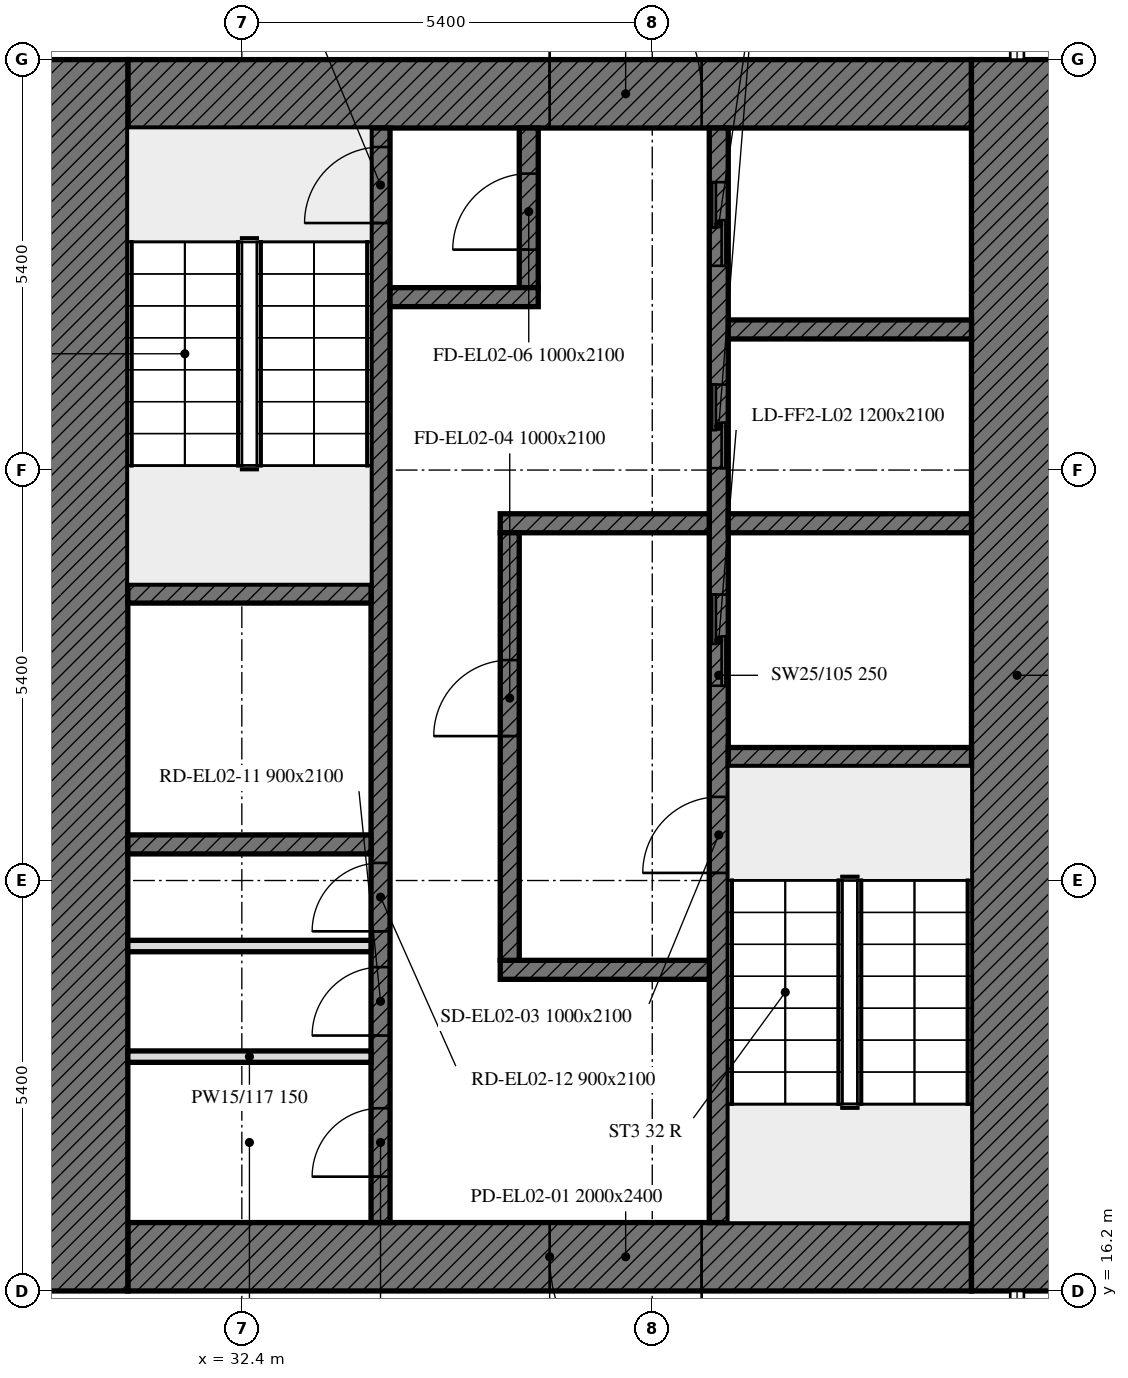
"""IFC4 building model, lengths in metres.
Left out: names, types, materials, properties, quantities, classifications, styles, units other than length and angle.
Written with IfcOpenShell. Run it as: python <this file> out.ifc"""

import sys

from ifc_helpers import new_model, si_unit, direction, frame, frame_2d, origin, place, context, subcontext, project, spatial, rectangle, extrude, element, fill, save


model = new_model("IFC4")
c1 = context("Model", 3, precision=1e-05, world=origin(), true_north=direction((0.0, 1.0)))
c2 = subcontext(c1, "Body", "Model", "MODEL_VIEW")
j1 = project(units=[si_unit("LENGTHUNIT", "METRE"), si_unit("PLANEANGLEUNIT", "RADIAN")], contexts=[c1])
p1 = place(None, origin())
s1 = spatial("IfcSite", under=j1, at=p1, CompositionType="ELEMENT")
p2 = place(p1, origin())
s2 = spatial("IfcBuilding", under=s1, at=p2, CompositionType="ELEMENT")
p3 = place(p2, frame((0.0, 0.0, 14.4)))
s3 = spatial("IfcBuildingStorey", under=s2, at=p3, CompositionType="ELEMENT", Elevation=14.4)
p4 = place(p3, frame((42.0, 16.65, 0.0), z_axis=(0.0, 0.0, 1.0), x_axis=(-1.0, 0.0, 0.0)))
e1 = element("IfcWall", 1, at=p4, inside=s3, PredefinedType="SOLIDWALL", context=c2, shape_type="SweptSolid", body=[
    extrude(rectangle(XDim=11.1, YDim=0.9, at=frame_2d((5.55, 0.0))), origin(), (0.0, 0.0, 1.0), 5.0),
])
p5 = place(p4, frame((3.55, 0.0, 0.0)))
e2 = element("IfcOpeningElement", 2, at=p5, cuts=e1, PredefinedType="OPENING", context=c2, shape_type="SweptSolid", body=[
    extrude(rectangle(XDim=2.0, YDim=2.4, at=frame_2d((1.0, 1.2))), frame((0.0, 0.45, 0.0), z_axis=(0.0, -1.0, 0.0), x_axis=(1.0, 0.0, 0.0)), (0.0, 0.0, 1.0), 0.9),
])
p6 = place(p3, frame((30.9, 31.95, 0.0), z_axis=(0.0, 0.0, 1.0), x_axis=(1.0, 0.0, 0.0)))
e3 = element("IfcWall", 3, at=p6, inside=s3, PredefinedType="SOLIDWALL", context=c2, shape_type="SweptSolid", body=[
    extrude(rectangle(XDim=11.1, YDim=0.9, at=frame_2d((5.55, 0.0))), origin(), (0.0, 0.0, 1.0), 5.0),
])
p7 = place(p6, frame((5.55, 0.0, 0.0)))
e4 = element("IfcOpeningElement", 4, at=p7, cuts=e3, PredefinedType="OPENING", context=c2, shape_type="SweptSolid", body=[
    extrude(rectangle(XDim=2.0, YDim=2.4, at=frame_2d((1.0, 1.2))), frame((0.0, 0.45, 0.0), z_axis=(0.0, -1.0, 0.0), x_axis=(1.0, 0.0, 0.0)), (0.0, 0.0, 1.0), 0.9),
])
for number, where, z_axis, x_axis in (
    (5, (42.6, 32.4, 0.0), (0.0, 0.0, 1.0), (0.0, -1.0, 0.0)),
    (6, (30.3, 16.2, 0.0), (0.0, 0.0, 1.0), (0.0, 1.0, 0.0)),
):
    element("IfcWall", number, at=place(p3, frame(where, z_axis=z_axis, x_axis=x_axis)), inside=s3, PredefinedType="SOLIDWALL", context=c2, shape_type="SweptSolid", body=[
        extrude(rectangle(XDim=16.2, YDim=1.2, at=frame_2d((8.1, 0.0))), origin(), (0.0, 0.0, 1.0), 5.0),
    ])
p8 = place(p3, frame((38.675, 17.1, 0.0), z_axis=(0.0, 0.0, 1.0), x_axis=(0.0, 1.0, 0.0)))
e7 = element("IfcWall", 7, at=p8, inside=s3, PredefinedType="SOLIDWALL", context=c2, shape_type="SweptSolid", body=[
    extrude(rectangle(XDim=14.4, YDim=0.25, at=frame_2d((7.2, 0.0))), origin(), (0.0, 0.0, 1.0), 5.0),
])
p9 = place(p8, frame((4.6, 0.0, 0.0)))
e8 = element("IfcOpeningElement", 8, at=p9, cuts=e7, PredefinedType="OPENING", context=c2, shape_type="SweptSolid", body=[
    extrude(rectangle(XDim=1.0, YDim=2.1, at=frame_2d((0.5, 1.05))), frame((0.0, 0.125, 0.0), z_axis=(0.0, -1.0, 0.0), x_axis=(1.0, 0.0, 0.0)), (0.0, 0.0, 1.0), 0.25),
])
p10 = place(p8, frame((7.062, 0.0, 0.0)))
e9 = element("IfcOpeningElement", 9, at=p10, cuts=e7, PredefinedType="OPENING", context=c2, shape_type="SweptSolid", body=[
    extrude(rectangle(XDim=1.2, YDim=2.1, at=frame_2d((0.6, 1.05))), frame((0.0, 0.125, 0.0), z_axis=(0.0, -1.0, 0.0), x_axis=(1.0, 0.0, 0.0)), (0.0, 0.0, 1.0), 0.25),
])
p11 = place(p8, frame((9.925, 0.0, 0.0)))
e10 = element("IfcOpeningElement", 10, at=p11, cuts=e7, PredefinedType="OPENING", context=c2, shape_type="SweptSolid", body=[
    extrude(rectangle(XDim=1.1, YDim=2.1, at=frame_2d((0.55, 1.05))), frame((0.0, 0.125, 0.0), z_axis=(0.0, -1.0, 0.0), x_axis=(1.0, 0.0, 0.0)), (0.0, 0.0, 1.0), 0.25),
])
p12 = place(p8, frame((12.587, 0.0, 0.0)))
e11 = element("IfcOpeningElement", 11, at=p12, cuts=e7, PredefinedType="OPENING", context=c2, shape_type="SweptSolid", body=[
    extrude(rectangle(XDim=1.1, YDim=2.1, at=frame_2d((0.55, 1.05))), frame((0.0, 0.125, 0.0), z_axis=(0.0, -1.0, 0.0), x_axis=(1.0, 0.0, 0.0)), (0.0, 0.0, 1.0), 0.25),
])
p13 = place(p3, frame((34.225, 17.1, 0.0), z_axis=(0.0, 0.0, 1.0), x_axis=(0.0, 1.0, 0.0)))
e12 = element("IfcWall", 12, at=p13, inside=s3, PredefinedType="SOLIDWALL", context=c2, shape_type="SweptSolid", body=[
    extrude(rectangle(XDim=14.4, YDim=0.25, at=frame_2d((7.2, 0.0))), origin(), (0.0, 0.0, 1.0), 5.0),
])
p14 = place(p13, frame((13.15, 0.0, 0.0)))
e13 = element("IfcOpeningElement", 13, at=p14, cuts=e12, PredefinedType="OPENING", context=c2, shape_type="SweptSolid", body=[
    extrude(rectangle(XDim=1.0, YDim=2.1, at=frame_2d((0.5, 1.05))), frame((0.0, 0.125, 0.0), z_axis=(0.0, -1.0, 0.0), x_axis=(1.0, 0.0, 0.0)), (0.0, 0.0, 1.0), 0.25),
])
p15 = place(p13, frame((0.604, 0.0, 0.0)))
e14 = element("IfcOpeningElement", 14, at=p15, cuts=e12, PredefinedType="OPENING", context=c2, shape_type="SweptSolid", body=[
    extrude(rectangle(XDim=0.9, YDim=2.1, at=frame_2d((0.45, 1.05))), frame((0.0, 0.125, 0.0), z_axis=(0.0, -1.0, 0.0), x_axis=(1.0, 0.0, 0.0)), (0.0, 0.0, 1.0), 0.25),
])
p16 = place(p13, frame((2.46, 0.0, 0.0)))
e15 = element("IfcOpeningElement", 15, at=p16, cuts=e12, PredefinedType="OPENING", context=c2, shape_type="SweptSolid", body=[
    extrude(rectangle(XDim=0.9, YDim=2.1, at=frame_2d((0.45, 1.05))), frame((0.0, 0.125, 0.0), z_axis=(0.0, -1.0, 0.0), x_axis=(1.0, 0.0, 0.0)), (0.0, 0.0, 1.0), 0.25),
])
p17 = place(p13, frame((3.832, 0.0, 0.0)))
e16 = element("IfcOpeningElement", 16, at=p17, cuts=e12, PredefinedType="OPENING", context=c2, shape_type="SweptSolid", body=[
    extrude(rectangle(XDim=0.9, YDim=2.1, at=frame_2d((0.45, 1.05))), frame((0.0, 0.125, 0.0), z_axis=(0.0, -1.0, 0.0), x_axis=(1.0, 0.0, 0.0)), (0.0, 0.0, 1.0), 0.25),
])
p18 = place(p3, frame((38.8, 23.225, 0.0), z_axis=(0.0, 0.0, 1.0), x_axis=(1.0, 0.0, 0.0)))
e17 = element("IfcWall", 17, at=p18, inside=s3, PredefinedType="SOLIDWALL", context=c2, shape_type="SweptSolid", body=[
    extrude(rectangle(XDim=3.2, YDim=0.25, at=frame_2d((1.6, 0.0))), origin(), (0.0, 0.0, 1.0), 5.0),
])
for number, where, z_axis, x_axis in (
    (18, (30.9, 25.375, 0.0), (0.0, 0.0, 1.0), (1.0, 0.0, 0.0)),
    (19, (30.9, 22.075, 0.0), (0.0, 0.0, 1.0), (1.0, 0.0, 0.0)),
):
    element("IfcWall", number, at=place(p3, frame(where, z_axis=z_axis, x_axis=x_axis)), inside=s3, PredefinedType="SOLIDWALL", context=c2, shape_type="SweptSolid", body=[
        extrude(rectangle(XDim=3.2, YDim=0.25, at=frame_2d((1.6, 0.0))), origin(), (0.0, 0.0, 1.0), 5.0),
    ])
p19 = place(p3, frame((38.8, 26.3, 0.0), z_axis=(0.0, 0.0, 1.0), x_axis=(1.0, 0.0, 0.0)))
e20 = element("IfcWall", 20, at=p19, inside=s3, PredefinedType="SOLIDWALL", context=c2, shape_type="SweptSolid", body=[
    extrude(rectangle(XDim=3.2, YDim=0.25, at=frame_2d((1.6, 0.0))), origin(), (0.0, 0.0, 1.0), 5.0),
])
for number, where, z_axis, x_axis in (
    (21, (35.8, 26.3, 0.0), (0.0, 0.0, 1.0), (1.0, 0.0, 0.0)),
    (22, (35.8, 20.425, 0.0), (0.0, 0.0, 1.0), (1.0, 0.0, 0.0)),
):
    element("IfcWall", number, at=place(p3, frame(where, z_axis=z_axis, x_axis=x_axis)), inside=s3, PredefinedType="SOLIDWALL", context=c2, shape_type="SweptSolid", body=[
        extrude(rectangle(XDim=2.75, YDim=0.25, at=frame_2d((1.375, 0.0))), origin(), (0.0, 0.0, 1.0), 5.0),
    ])
p20 = place(p3, frame((36.175, 29.4, 0.0), z_axis=(0.0, 0.0, 1.0), x_axis=(0.0, 1.0, 0.0)))
e23 = element("IfcWall", 23, at=p20, inside=s3, PredefinedType="SOLIDWALL", context=c2, shape_type="SweptSolid", body=[
    extrude(rectangle(XDim=2.1, YDim=0.25, at=frame_2d((1.05, 0.0))), origin(), (0.0, 0.0, 1.0), 5.0),
])
p21 = place(p20, frame((0.5, 0.0, 0.0)))
e24 = element("IfcOpeningElement", 24, at=p21, cuts=e23, PredefinedType="OPENING", context=c2, shape_type="SweptSolid", body=[
    extrude(rectangle(XDim=1.0, YDim=2.1, at=frame_2d((0.5, 1.05))), frame((0.0, 0.125, 0.0), z_axis=(0.0, -1.0, 0.0), x_axis=(1.0, 0.0, 0.0)), (0.0, 0.0, 1.0), 0.25),
])
p22 = place(p3, frame((34.35, 29.275, 0.0), z_axis=(0.0, 0.0, 1.0), x_axis=(1.0, 0.0, 0.0)))
e25 = element("IfcWall", 25, at=p22, inside=s3, PredefinedType="SOLIDWALL", context=c2, shape_type="SweptSolid", body=[
    extrude(rectangle(XDim=1.95, YDim=0.25, at=frame_2d((0.975, 0.0))), origin(), (0.0, 0.0, 1.0), 5.0),
])
p23 = place(p3, frame((35.925, 20.55, 0.0), z_axis=(0.0, 0.0, 1.0), x_axis=(0.0, 1.0, 0.0)))
e26 = element("IfcWall", 26, at=p23, inside=s3, PredefinedType="SOLIDWALL", context=c2, shape_type="SweptSolid", body=[
    extrude(rectangle(XDim=5.625, YDim=0.25, at=frame_2d((2.812, 0.0))), origin(), (0.0, 0.0, 1.0), 5.0),
])
p24 = place(p23, frame((2.95, 0.0, 0.0)))
e27 = element("IfcOpeningElement", 27, at=p24, cuts=e26, PredefinedType="OPENING", context=c2, shape_type="SweptSolid", body=[
    extrude(rectangle(XDim=1.0, YDim=2.1, at=frame_2d((0.5, 1.05))), frame((0.0, 0.125, 0.0), z_axis=(0.0, -1.0, 0.0), x_axis=(1.0, 0.0, 0.0)), (0.0, 0.0, 1.0), 0.25),
])
p25 = place(p3, frame((38.8, 28.85, 0.0), z_axis=(0.0, 0.0, 1.0), x_axis=(1.0, 0.0, 0.0)))
e28 = element("IfcWall", 28, at=p25, inside=s3, PredefinedType="SOLIDWALL", context=c2, shape_type="SweptSolid", body=[
    extrude(rectangle(XDim=3.2, YDim=0.25, at=frame_2d((1.6, 0.0))), origin(), (0.0, 0.0, 1.0), 5.0),
])
for number, where, z_axis, x_axis in (
    (29, (30.9, 19.283, 0.0), (0.0, 0.0, 1.0), (1.0, 0.0, 0.0)),
    (30, (30.9, 20.738, 0.0), (0.0, 0.0, 1.0), (1.0, 0.0, 0.0)),
):
    element("IfcWall", number, at=place(p3, frame(where, z_axis=z_axis, x_axis=x_axis)), inside=s3, PredefinedType="PARTITIONING", context=c2, shape_type="SweptSolid", body=[
        extrude(rectangle(XDim=3.2, YDim=0.15, at=frame_2d((1.6, 0.0))), origin(), (0.0, 0.0, 1.0), 5.0),
    ])
p26 = place(p5, origin())
e31 = element("IfcDoor", 31, at=p26, inside=s3, OperationType="DOUBLE_DOOR_SINGLE_SWING", PredefinedType="DOOR", context=c2, shape_type="SweptSolid", body=[
    extrude(rectangle(XDim=2.0, YDim=2.4, at=frame_2d((1.0, 1.2))), frame((0.0, 0.025, 0.0), z_axis=(0.0, -1.0, 0.0), x_axis=(1.0, 0.0, 0.0)), (0.0, 0.0, 1.0), 0.05),
])
fill(e2, e31)
p27 = place(p7, origin())
e32 = element("IfcDoor", 32, at=p27, inside=s3, OperationType="DOUBLE_DOOR_SINGLE_SWING", PredefinedType="DOOR", context=c2, shape_type="SweptSolid", body=[
    extrude(rectangle(XDim=2.0, YDim=2.4, at=frame_2d((1.0, 1.2))), frame((0.0, 0.025, 0.0), z_axis=(0.0, -1.0, 0.0), x_axis=(1.0, 0.0, 0.0)), (0.0, 0.0, 1.0), 0.05),
])
fill(e4, e32)
p28 = place(p9, origin())
e33 = element("IfcDoor", 33, at=p28, inside=s3, OperationType="SINGLE_SWING_LEFT", PredefinedType="DOOR", context=c2, shape_type="SweptSolid", body=[
    extrude(rectangle(XDim=1.0, YDim=2.1, at=frame_2d((0.5, 1.05))), frame((0.0, 0.025, 0.0), z_axis=(0.0, -1.0, 0.0), x_axis=(1.0, 0.0, 0.0)), (0.0, 0.0, 1.0), 0.05),
])
fill(e8, e33)
p29 = place(p24, origin())
e34 = element("IfcDoor", 34, at=p29, inside=s3, OperationType="SINGLE_SWING_LEFT", PredefinedType="DOOR", context=c2, shape_type="SweptSolid", body=[
    extrude(rectangle(XDim=1.0, YDim=2.1, at=frame_2d((0.5, 1.05))), frame((0.0, 0.025, 0.0), z_axis=(0.0, -1.0, 0.0), x_axis=(1.0, 0.0, 0.0)), (0.0, 0.0, 1.0), 0.05),
])
fill(e27, e34)
p30 = place(p14, origin())
e35 = element("IfcDoor", 35, at=p30, inside=s3, OperationType="SINGLE_SWING_LEFT", PredefinedType="DOOR", context=c2, shape_type="SweptSolid", body=[
    extrude(rectangle(XDim=1.0, YDim=2.1, at=frame_2d((0.5, 1.05))), frame((0.0, 0.025, 0.0), z_axis=(0.0, -1.0, 0.0), x_axis=(1.0, 0.0, 0.0)), (0.0, 0.0, 1.0), 0.05),
])
fill(e13, e35)
p31 = place(p21, origin())
e36 = element("IfcDoor", 36, at=p31, inside=s3, OperationType="SINGLE_SWING_LEFT", PredefinedType="DOOR", context=c2, shape_type="SweptSolid", body=[
    extrude(rectangle(XDim=1.0, YDim=2.1, at=frame_2d((0.5, 1.05))), frame((0.0, 0.025, 0.0), z_axis=(0.0, -1.0, 0.0), x_axis=(1.0, 0.0, 0.0)), (0.0, 0.0, 1.0), 0.05),
])
fill(e24, e36)
p32 = place(p10, origin())
e37 = element("IfcDoor", 37, at=p32, inside=s3, OperationType="DOUBLE_DOOR_SLIDING", PredefinedType="DOOR", context=c2, shape_type="SweptSolid", body=[
    extrude(rectangle(XDim=1.2, YDim=2.1, at=frame_2d((0.6, 1.05))), frame((0.0, 0.025, 0.0), z_axis=(0.0, -1.0, 0.0), x_axis=(1.0, 0.0, 0.0)), (0.0, 0.0, 1.0), 0.05),
])
fill(e9, e37)
p33 = place(p11, origin())
e38 = element("IfcDoor", 38, at=p33, inside=s3, OperationType="DOUBLE_DOOR_SLIDING", PredefinedType="DOOR", context=c2, shape_type="SweptSolid", body=[
    extrude(rectangle(XDim=1.1, YDim=2.1, at=frame_2d((0.55, 1.05))), frame((0.0, 0.025, 0.0), z_axis=(0.0, -1.0, 0.0), x_axis=(1.0, 0.0, 0.0)), (0.0, 0.0, 1.0), 0.05),
])
fill(e10, e38)
p34 = place(p12, origin())
e39 = element("IfcDoor", 39, at=p34, inside=s3, OperationType="DOUBLE_DOOR_SLIDING", PredefinedType="DOOR", context=c2, shape_type="SweptSolid", body=[
    extrude(rectangle(XDim=1.1, YDim=2.1, at=frame_2d((0.55, 1.05))), frame((0.0, 0.025, 0.0), z_axis=(0.0, -1.0, 0.0), x_axis=(1.0, 0.0, 0.0)), (0.0, 0.0, 1.0), 0.05),
])
fill(e11, e39)
p35 = place(p15, origin())
e40 = element("IfcDoor", 40, at=p35, inside=s3, OperationType="SINGLE_SWING_LEFT", PredefinedType="DOOR", context=c2, shape_type="SweptSolid", body=[
    extrude(rectangle(XDim=0.9, YDim=2.1, at=frame_2d((0.45, 1.05))), frame((0.0, 0.025, 0.0), z_axis=(0.0, -1.0, 0.0), x_axis=(1.0, 0.0, 0.0)), (0.0, 0.0, 1.0), 0.05),
])
fill(e14, e40)
p36 = place(p16, origin())
e41 = element("IfcDoor", 41, at=p36, inside=s3, OperationType="SINGLE_SWING_LEFT", PredefinedType="DOOR", context=c2, shape_type="SweptSolid", body=[
    extrude(rectangle(XDim=0.9, YDim=2.1, at=frame_2d((0.45, 1.05))), frame((0.0, 0.025, 0.0), z_axis=(0.0, -1.0, 0.0), x_axis=(1.0, 0.0, 0.0)), (0.0, 0.0, 1.0), 0.05),
])
fill(e15, e41)
p37 = place(p17, origin())
e42 = element("IfcDoor", 42, at=p37, inside=s3, OperationType="SINGLE_SWING_LEFT", PredefinedType="DOOR", context=c2, shape_type="SweptSolid", body=[
    extrude(rectangle(XDim=0.9, YDim=2.1, at=frame_2d((0.45, 1.05))), frame((0.0, 0.025, 0.0), z_axis=(0.0, -1.0, 0.0), x_axis=(1.0, 0.0, 0.0)), (0.0, 0.0, 1.0), 0.05),
])
fill(e16, e42)
save(model, sys.argv[1])
